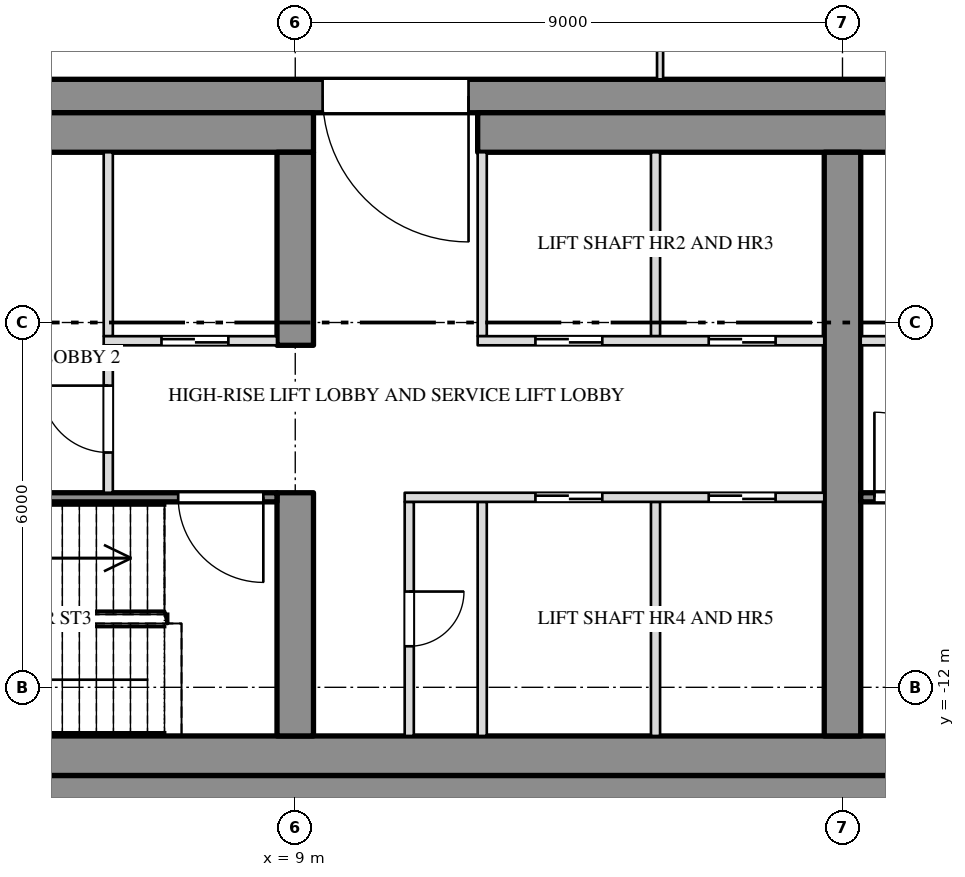
"""IFC4 building model, lengths in metres.
Left out: names, types, materials, properties, quantities, classifications, styles, units other than length and angle.
Written with IfcOpenShell. Run it as: python <this file> out.ifc"""

import sys

from ifc_helpers import new_model, si_unit, direction, frame, frame_2d, origin, place, context, subcontext, project, spatial, rectangle, extrude, element, fill, save


model = new_model("IFC4")
c1 = context("Model", 3, precision=1e-05, world=origin(), true_north=direction((0.0, 1.0)))
c2 = subcontext(c1, "Body", "Model", "MODEL_VIEW")
j1 = project(units=[si_unit("LENGTHUNIT", "METRE"), si_unit("PLANEANGLEUNIT", "RADIAN")], contexts=[c1])
p1 = place(None, origin())
s1 = spatial("IfcSite", under=j1, at=p1, CompositionType="ELEMENT")
p2 = place(p1, origin())
s2 = spatial("IfcBuilding", under=s1, at=p2, CompositionType="ELEMENT")
p3 = place(p2, frame((0.0, 0.0, 280.5)))
s3 = spatial("IfcBuildingStorey", under=s2, at=p3, CompositionType="ELEMENT", Elevation=280.5)
p4 = place(p3, frame((-27.0, -2.275, 0.0), z_axis=(0.0, 0.0, 1.0), x_axis=(1.0, 0.0, 0.0)))
e1 = element("IfcWall", 1, at=p4, inside=s3, PredefinedType="SHEAR", context=c2, shape_type="SweptSolid", body=[
    extrude(rectangle(XDim=54.0, YDim=0.55, at=frame_2d((27.0, 0.0))), origin(), (0.0, 0.0, 1.0), 3.78),
])
p5 = place(p4, frame((15.15, 0.0, 0.0)))
e2 = element("IfcOpeningElement", 2, at=p5, cuts=e1, PredefinedType="OPENING", context=c2, shape_type="SweptSolid", body=[
    extrude(rectangle(XDim=2.4, YDim=2.1, at=frame_2d((1.2, 1.05))), frame((0.0, 0.287, 0.0), z_axis=(0.0, -1.0, 0.0), x_axis=(1.0, 0.0, 0.0)), (0.0, 0.0, 1.0), 0.574),
])
p6 = place(p4, frame((36.45, 0.0, 0.0)))
e3 = element("IfcOpeningElement", 3, at=p6, cuts=e1, PredefinedType="OPENING", context=c2, shape_type="SweptSolid", body=[
    extrude(rectangle(XDim=2.4, YDim=2.1, at=frame_2d((1.2, 1.05))), frame((0.0, 0.287, 0.0), z_axis=(0.0, -1.0, 0.0), x_axis=(1.0, 0.0, 0.0)), (0.0, 0.0, 1.0), 0.574),
])
p7 = place(p3, frame((-27.0, -13.725, 0.0), z_axis=(0.0, 0.0, 1.0), x_axis=(1.0, 0.0, 0.0)))
e4 = element("IfcWall", 4, at=p7, inside=s3, PredefinedType="SHEAR", context=c2, shape_type="SweptSolid", body=[
    extrude(rectangle(XDim=54.0, YDim=0.55, at=frame_2d((27.0, 0.0))), origin(), (0.0, 0.0, 1.0), 3.78),
])
p8 = place(p3, frame((-9.3, -2.875, 0.0), z_axis=(0.0, 0.0, 1.0), x_axis=(1.0, 0.0, 0.0)))
e5 = element("IfcWall", 5, at=p8, inside=s3, PredefinedType="SHEAR", context=c2, shape_type="SweptSolid", body=[
    extrude(rectangle(XDim=18.6, YDim=0.65, at=frame_2d((9.3, 0.0))), origin(), (0.0, 0.0, 1.0), 3.78),
])
p9 = place(p3, frame((12.0, -2.875, 0.0), z_axis=(0.0, 0.0, 1.0), x_axis=(1.0, 0.0, 0.0)))
e6 = element("IfcWall", 6, at=p9, inside=s3, PredefinedType="SHEAR", context=c2, shape_type="SweptSolid", body=[
    extrude(rectangle(XDim=14.45, YDim=0.65, at=frame_2d((7.225, 0.0))), origin(), (0.0, 0.0, 1.0), 3.78),
])
p10 = place(p3, frame((-26.45, -13.125, 0.0), z_axis=(0.0, 0.0, 1.0), x_axis=(1.0, 0.0, 0.0)))
e7 = element("IfcWall", 7, at=p10, inside=s3, PredefinedType="SHEAR", context=c2, shape_type="SweptSolid", body=[
    extrude(rectangle(XDim=52.9, YDim=0.65, at=frame_2d((26.45, 0.0))), origin(), (0.0, 0.0, 1.0), 3.78),
])
p11 = place(p3, frame((9.0, -12.8, 0.0), z_axis=(0.0, 0.0, 1.0), x_axis=(0.0, 1.0, 0.0)))
e8 = element("IfcWall", 8, at=p11, inside=s3, PredefinedType="SHEAR", context=c2, shape_type="SweptSolid", body=[
    extrude(rectangle(XDim=4.0, YDim=0.6, at=frame_2d((2.0, 0.0))), origin(), (0.0, 0.0, 1.0), 3.78),
])
p12 = place(p3, frame((9.0, -6.375, 0.0), z_axis=(0.0, 0.0, 1.0), x_axis=(0.0, 1.0, 0.0)))
e9 = element("IfcWall", 9, at=p12, inside=s3, PredefinedType="SHEAR", context=c2, shape_type="SweptSolid", body=[
    extrude(rectangle(XDim=3.175, YDim=0.6, at=frame_2d((1.587, 0.0))), origin(), (0.0, 0.0, 1.0), 3.78),
])
p13 = place(p3, frame((18.0, -12.8, 0.0), z_axis=(0.0, 0.0, 1.0), x_axis=(0.0, 1.0, 0.0)))
e10 = element("IfcWall", 10, at=p13, inside=s3, PredefinedType="SHEAR", context=c2, shape_type="SweptSolid", body=[
    extrude(rectangle(XDim=9.6, YDim=0.6, at=frame_2d((4.8, 0.0))), origin(), (0.0, 0.0, 1.0), 3.78),
])
p14 = place(p3, frame((15.0, -2.0, 0.0), z_axis=(0.0, 0.0, 1.0), x_axis=(0.0, 1.0, 0.0)))
e11 = element("IfcWall", 11, at=p14, inside=s3, PredefinedType="PARTITIONING", context=c2, shape_type="SweptSolid", body=[
    extrude(rectangle(XDim=38.2, YDim=0.1, at=frame_2d((19.1, 0.0))), origin(), (0.0, 0.0, 1.0), 3.78),
])
p15 = place(p14, frame((13.03, 0.0, 0.0)))
e12 = element("IfcOpeningElement", 12, at=p15, cuts=e11, PredefinedType="OPENING", context=c2, shape_type="SweptSolid", body=[
    extrude(rectangle(XDim=0.9, YDim=2.1, at=frame_2d((0.45, 1.05))), frame((0.0, 0.062, 0.0), z_axis=(0.0, -1.0, 0.0), x_axis=(1.0, 0.0, 0.0)), (0.0, 0.0, 1.0), 0.124),
])
p16 = place(p14, frame((22.77, 0.0, 0.0)))
e13 = element("IfcOpeningElement", 13, at=p16, cuts=e11, PredefinedType="OPENING", context=c2, shape_type="SweptSolid", body=[
    extrude(rectangle(XDim=0.9, YDim=2.1, at=frame_2d((0.45, 1.05))), frame((0.0, 0.062, 0.0), z_axis=(0.0, -1.0, 0.0), x_axis=(1.0, 0.0, 0.0)), (0.0, 0.0, 1.0), 0.124),
])
p17 = place(p14, frame((32.71, 0.0, 0.0)))
e14 = element("IfcOpeningElement", 14, at=p17, cuts=e11, PredefinedType="OPENING", context=c2, shape_type="SweptSolid", body=[
    extrude(rectangle(XDim=0.9, YDim=2.1, at=frame_2d((0.45, 1.05))), frame((0.0, 0.062, 0.0), z_axis=(0.0, -1.0, 0.0), x_axis=(1.0, 0.0, 0.0)), (0.0, 0.0, 1.0), 0.124),
])
for number, where, z_axis, x_axis in (
    (15, (5.925, -6.225, 0.0), (0.0, 0.0, 1.0), (0.0, 1.0, 0.0)),
    (16, (12.075, -6.225, 0.0), (0.0, 0.0, 1.0), (0.0, 1.0, 0.0)),
    (17, (14.925, -6.225, 0.0), (0.0, 0.0, 1.0), (0.0, 1.0, 0.0)),
):
    element("IfcWall", number, at=place(p3, frame(where, z_axis=z_axis, x_axis=x_axis)), inside=s3, PredefinedType="PARTITIONING", context=c2, shape_type="SweptSolid", body=[
        extrude(rectangle(XDim=3.025, YDim=0.15, at=frame_2d((1.513, 0.0))), origin(), (0.0, 0.0, 1.0), 3.78),
    ])
p18 = place(p3, frame((10.875, -12.8, 0.0), z_axis=(0.0, 0.0, 1.0), x_axis=(0.0, 1.0, 0.0)))
e18 = element("IfcWall", 18, at=p18, inside=s3, PredefinedType="PARTITIONING", context=c2, shape_type="SweptSolid", body=[
    extrude(rectangle(XDim=3.85, YDim=0.15, at=frame_2d((1.925, 0.0))), origin(), (0.0, 0.0, 1.0), 3.78),
])
p19 = place(p18, frame((1.475, 0.0, 0.0)))
e19 = element("IfcOpeningElement", 19, at=p19, cuts=e18, PredefinedType="OPENING", context=c2, shape_type="SweptSolid", body=[
    extrude(rectangle(XDim=0.9, YDim=2.1, at=frame_2d((0.45, 1.05))), frame((0.0, 0.087, 0.0), z_axis=(0.0, -1.0, 0.0), x_axis=(1.0, 0.0, 0.0)), (0.0, 0.0, 1.0), 0.174),
])
for number, where, z_axis, x_axis in (
    (20, (12.075, -12.8, 0.0), (0.0, 0.0, 1.0), (0.0, 1.0, 0.0)),
    (21, (14.925, -12.8, 0.0), (0.0, 0.0, 1.0), (0.0, 1.0, 0.0)),
):
    element("IfcWall", number, at=place(p3, frame(where, z_axis=z_axis, x_axis=x_axis)), inside=s3, PredefinedType="PARTITIONING", context=c2, shape_type="SweptSolid", body=[
        extrude(rectangle(XDim=3.85, YDim=0.15, at=frame_2d((1.925, 0.0))), origin(), (0.0, 0.0, 1.0), 3.78),
    ])
p20 = place(p3, frame((5.925, -8.8, 0.0), z_axis=(0.0, 0.0, 1.0), x_axis=(0.0, 1.0, 0.0)))
e22 = element("IfcWall", 22, at=p20, inside=s3, PredefinedType="PARTITIONING", context=c2, shape_type="SweptSolid", body=[
    extrude(rectangle(XDim=2.425, YDim=0.15, at=frame_2d((1.212, 0.0))), origin(), (0.0, 0.0, 1.0), 3.78),
])
p21 = place(p20, frame((0.662, 0.0, 0.0)))
e23 = element("IfcOpeningElement", 23, at=p21, cuts=e22, PredefinedType="OPENING", context=c2, shape_type="SweptSolid", body=[
    extrude(rectangle(XDim=1.1, YDim=2.1, at=frame_2d((0.55, 1.05))), frame((0.0, 0.087, 0.0), z_axis=(0.0, -1.0, 0.0), x_axis=(1.0, 0.0, 0.0)), (0.0, 0.0, 1.0), 0.174),
])
p22 = place(p3, frame((5.85, -6.3, 0.0), z_axis=(0.0, 0.0, 1.0), x_axis=(1.0, 0.0, 0.0)))
e24 = element("IfcWall", 24, at=p22, inside=s3, PredefinedType="PARTITIONING", context=c2, shape_type="SweptSolid", body=[
    extrude(rectangle(XDim=2.85, YDim=0.15, at=frame_2d((1.425, 0.0))), origin(), (0.0, 0.0, 1.0), 3.78),
])
p23 = place(p22, frame((0.95, 0.0, 0.0)))
e25 = element("IfcOpeningElement", 25, at=p23, cuts=e24, PredefinedType="OPENING", context=c2, shape_type="SweptSolid", body=[
    extrude(rectangle(XDim=1.1, YDim=2.1, at=frame_2d((0.55, 1.05))), frame((0.0, 0.087, 0.0), z_axis=(0.0, -1.0, 0.0), x_axis=(1.0, 0.0, 0.0)), (0.0, 0.0, 1.0), 0.174),
])
p24 = place(p3, frame((12.0, -6.3, 0.0), z_axis=(0.0, 0.0, 1.0), x_axis=(1.0, 0.0, 0.0)))
e26 = element("IfcWall", 26, at=p24, inside=s3, PredefinedType="PARTITIONING", context=c2, shape_type="SweptSolid", body=[
    extrude(rectangle(XDim=5.7, YDim=0.15, at=frame_2d((2.85, 0.0))), origin(), (0.0, 0.0, 1.0), 3.78),
])
p25 = place(p24, frame((0.95, 0.0, 0.0)))
e27 = element("IfcOpeningElement", 27, at=p25, cuts=e26, PredefinedType="OPENING", context=c2, shape_type="SweptSolid", body=[
    extrude(rectangle(XDim=1.1, YDim=2.1, at=frame_2d((0.55, 1.05))), frame((0.0, 0.087, 0.0), z_axis=(0.0, -1.0, 0.0), x_axis=(1.0, 0.0, 0.0)), (0.0, 0.0, 1.0), 0.174),
])
p26 = place(p24, frame((3.8, 0.0, 0.0)))
e28 = element("IfcOpeningElement", 28, at=p26, cuts=e26, PredefinedType="OPENING", context=c2, shape_type="SweptSolid", body=[
    extrude(rectangle(XDim=1.1, YDim=2.1, at=frame_2d((0.55, 1.05))), frame((0.0, 0.087, 0.0), z_axis=(0.0, -1.0, 0.0), x_axis=(1.0, 0.0, 0.0)), (0.0, 0.0, 1.0), 0.174),
])
p27 = place(p3, frame((18.3, -6.3, 0.0), z_axis=(0.0, 0.0, 1.0), x_axis=(1.0, 0.0, 0.0)))
e29 = element("IfcWall", 29, at=p27, inside=s3, PredefinedType="PARTITIONING", context=c2, shape_type="SweptSolid", body=[
    extrude(rectangle(XDim=7.5, YDim=0.15, at=frame_2d((3.75, 0.0))), origin(), (0.0, 0.0, 1.0), 3.78),
])
p28 = place(p27, frame((0.7, 0.0, 0.0)))
e30 = element("IfcOpeningElement", 30, at=p28, cuts=e29, PredefinedType="OPENING", context=c2, shape_type="SweptSolid", body=[
    extrude(rectangle(XDim=1.0, YDim=2.1, at=frame_2d((0.5, 1.05))), frame((0.0, 0.087, 0.0), z_axis=(0.0, -1.0, 0.0), x_axis=(1.0, 0.0, 0.0)), (0.0, 0.0, 1.0), 0.174),
])
p29 = place(p27, frame((3.25, 0.0, 0.0)))
e31 = element("IfcOpeningElement", 31, at=p29, cuts=e29, PredefinedType="OPENING", context=c2, shape_type="SweptSolid", body=[
    extrude(rectangle(XDim=1.0, YDim=2.1, at=frame_2d((0.5, 1.05))), frame((0.0, 0.087, 0.0), z_axis=(0.0, -1.0, 0.0), x_axis=(1.0, 0.0, 0.0)), (0.0, 0.0, 1.0), 0.174),
])
p30 = place(p27, frame((5.75, 0.0, 0.0)))
e32 = element("IfcOpeningElement", 32, at=p30, cuts=e29, PredefinedType="OPENING", context=c2, shape_type="SweptSolid", body=[
    extrude(rectangle(XDim=1.1, YDim=2.1, at=frame_2d((0.55, 1.05))), frame((0.0, 0.087, 0.0), z_axis=(0.0, -1.0, 0.0), x_axis=(1.0, 0.0, 0.0)), (0.0, 0.0, 1.0), 0.174),
])
p31 = place(p3, frame((0.3, -8.875, 0.0), z_axis=(0.0, 0.0, 1.0), x_axis=(1.0, 0.0, 0.0)))
e33 = element("IfcWall", 33, at=p31, inside=s3, PredefinedType="SHEAR", context=c2, shape_type="SweptSolid", body=[
    extrude(rectangle(XDim=8.4, YDim=0.15, at=frame_2d((4.2, 0.0))), origin(), (0.0, 0.0, 1.0), 3.78),
])
p32 = place(p31, frame((6.775, 0.0, 0.0)))
e34 = element("IfcOpeningElement", 34, at=p32, cuts=e33, PredefinedType="OPENING", context=c2, shape_type="SweptSolid", body=[
    extrude(rectangle(XDim=1.4, YDim=2.1, at=frame_2d((0.7, 1.05))), frame((0.0, 0.087, 0.0), z_axis=(0.0, -1.0, 0.0), x_axis=(1.0, 0.0, 0.0)), (0.0, 0.0, 1.0), 0.174),
])
p33 = place(p3, frame((10.8, -8.875, 0.0), z_axis=(0.0, 0.0, 1.0), x_axis=(1.0, 0.0, 0.0)))
e35 = element("IfcWall", 35, at=p33, inside=s3, PredefinedType="PARTITIONING", context=c2, shape_type="SweptSolid", body=[
    extrude(rectangle(XDim=6.9, YDim=0.15, at=frame_2d((3.45, 0.0))), origin(), (0.0, 0.0, 1.0), 3.78),
])
p34 = place(p33, frame((2.15, 0.0, 0.0)))
e36 = element("IfcOpeningElement", 36, at=p34, cuts=e35, PredefinedType="OPENING", context=c2, shape_type="SweptSolid", body=[
    extrude(rectangle(XDim=1.1, YDim=2.1, at=frame_2d((0.55, 1.05))), frame((0.0, 0.087, 0.0), z_axis=(0.0, -1.0, 0.0), x_axis=(1.0, 0.0, 0.0)), (0.0, 0.0, 1.0), 0.174),
])
p35 = place(p33, frame((5.0, 0.0, 0.0)))
e37 = element("IfcOpeningElement", 37, at=p35, cuts=e35, PredefinedType="OPENING", context=c2, shape_type="SweptSolid", body=[
    extrude(rectangle(XDim=1.1, YDim=2.1, at=frame_2d((0.55, 1.05))), frame((0.0, 0.087, 0.0), z_axis=(0.0, -1.0, 0.0), x_axis=(1.0, 0.0, 0.0)), (0.0, 0.0, 1.0), 0.174),
])
p36 = place(p3, frame((18.3, -8.875, 0.0), z_axis=(0.0, 0.0, 1.0), x_axis=(1.0, 0.0, 0.0)))
e38 = element("IfcWall", 38, at=p36, inside=s3, PredefinedType="SHEAR", context=c2, shape_type="SweptSolid", body=[
    extrude(rectangle(XDim=7.5, YDim=0.15, at=frame_2d((3.75, 0.0))), origin(), (0.0, 0.0, 1.0), 3.78),
])
p37 = place(p36, frame((0.225, 0.0, 0.0)))
e39 = element("IfcOpeningElement", 39, at=p37, cuts=e38, PredefinedType="OPENING", context=c2, shape_type="SweptSolid", body=[
    extrude(rectangle(XDim=1.4, YDim=2.1, at=frame_2d((0.7, 1.05))), frame((0.0, 0.087, 0.0), z_axis=(0.0, -1.0, 0.0), x_axis=(1.0, 0.0, 0.0)), (0.0, 0.0, 1.0), 0.174),
])
p38 = place(p21, origin())
e40 = element("IfcDoor", 40, at=p38, inside=s3, OperationType="SINGLE_SWING_RIGHT", PredefinedType="DOOR", context=c2, shape_type="SweptSolid", body=[
    extrude(rectangle(XDim=1.1, YDim=2.1, at=frame_2d((0.55, 1.05))), frame((0.0, 0.025, 0.0), z_axis=(0.0, -1.0, 0.0), x_axis=(1.0, 0.0, 0.0)), (0.0, 0.0, 1.0), 0.05),
])
fill(e23, e40)
p39 = place(p23, origin())
e41 = element("IfcDoor", 41, at=p39, inside=s3, OperationType="SLIDING_TO_RIGHT", PredefinedType="DOOR", context=c2, shape_type="SweptSolid", body=[
    extrude(rectangle(XDim=1.1, YDim=2.1, at=frame_2d((0.55, 1.05))), frame((0.0, 0.025, 0.0), z_axis=(0.0, -1.0, 0.0), x_axis=(1.0, 0.0, 0.0)), (0.0, 0.0, 1.0), 0.05),
])
fill(e25, e41)
p40 = place(p32, origin())
e42 = element("IfcDoor", 42, at=p40, inside=s3, OperationType="DOUBLE_DOOR_SINGLE_SWING", PredefinedType="DOOR", context=c2, shape_type="SweptSolid", body=[
    extrude(rectangle(XDim=1.4, YDim=2.1, at=frame_2d((0.7, 1.05))), frame((0.0, 0.025, 0.0), z_axis=(0.0, -1.0, 0.0), x_axis=(1.0, 0.0, 0.0)), (0.0, 0.0, 1.0), 0.05),
])
fill(e34, e42)
p41 = place(p6, origin())
e43 = element("IfcDoor", 43, at=p41, inside=s3, OperationType="DOUBLE_DOOR_SINGLE_SWING", PredefinedType="DOOR", context=c2, shape_type="SweptSolid", body=[
    extrude(rectangle(XDim=2.4, YDim=2.1, at=frame_2d((1.2, 1.05))), frame((0.0, 0.025, 0.0), z_axis=(0.0, -1.0, 0.0), x_axis=(1.0, 0.0, 0.0)), (0.0, 0.0, 1.0), 0.05),
])
fill(e3, e43)
p42 = place(p19, origin())
e44 = element("IfcDoor", 44, at=p42, inside=s3, OperationType="SINGLE_SWING_LEFT", PredefinedType="DOOR", context=c2, shape_type="SweptSolid", body=[
    extrude(rectangle(XDim=0.9, YDim=2.1, at=frame_2d((0.45, 1.05))), frame((0.0, 0.025, 0.0), z_axis=(0.0, -1.0, 0.0), x_axis=(1.0, 0.0, 0.0)), (0.0, 0.0, 1.0), 0.05),
])
fill(e19, e44)
p43 = place(p34, origin())
e45 = element("IfcDoor", 45, at=p43, inside=s3, OperationType="SLIDING_TO_RIGHT", PredefinedType="DOOR", context=c2, shape_type="SweptSolid", body=[
    extrude(rectangle(XDim=1.1, YDim=2.1, at=frame_2d((0.55, 1.05))), frame((0.0, 0.025, 0.0), z_axis=(0.0, -1.0, 0.0), x_axis=(1.0, 0.0, 0.0)), (0.0, 0.0, 1.0), 0.05),
])
fill(e36, e45)
p44 = place(p25, origin())
e46 = element("IfcDoor", 46, at=p44, inside=s3, OperationType="SLIDING_TO_LEFT", PredefinedType="DOOR", context=c2, shape_type="SweptSolid", body=[
    extrude(rectangle(XDim=1.1, YDim=2.1, at=frame_2d((0.55, 1.05))), frame((0.0, 0.025, 0.0), z_axis=(0.0, -1.0, 0.0), x_axis=(1.0, 0.0, 0.0)), (0.0, 0.0, 1.0), 0.05),
])
fill(e27, e46)
p45 = place(p35, origin())
e47 = element("IfcDoor", 47, at=p45, inside=s3, OperationType="SLIDING_TO_RIGHT", PredefinedType="DOOR", context=c2, shape_type="SweptSolid", body=[
    extrude(rectangle(XDim=1.1, YDim=2.1, at=frame_2d((0.55, 1.05))), frame((0.0, 0.025, 0.0), z_axis=(0.0, -1.0, 0.0), x_axis=(1.0, 0.0, 0.0)), (0.0, 0.0, 1.0), 0.05),
])
fill(e37, e47)
p46 = place(p26, origin())
e48 = element("IfcDoor", 48, at=p46, inside=s3, OperationType="SLIDING_TO_LEFT", PredefinedType="DOOR", context=c2, shape_type="SweptSolid", body=[
    extrude(rectangle(XDim=1.1, YDim=2.1, at=frame_2d((0.55, 1.05))), frame((0.0, 0.025, 0.0), z_axis=(0.0, -1.0, 0.0), x_axis=(1.0, 0.0, 0.0)), (0.0, 0.0, 1.0), 0.05),
])
fill(e28, e48)
p47 = place(p37, origin())
e49 = element("IfcDoor", 49, at=p47, inside=s3, OperationType="DOUBLE_DOOR_SINGLE_SWING", PredefinedType="DOOR", context=c2, shape_type="SweptSolid", body=[
    extrude(rectangle(XDim=1.4, YDim=2.1, at=frame_2d((0.7, 1.05))), frame((0.0, 0.025, 0.0), z_axis=(0.0, -1.0, 0.0), x_axis=(1.0, 0.0, 0.0)), (0.0, 0.0, 1.0), 0.05),
])
fill(e39, e49)
save(model, sys.argv[1])
